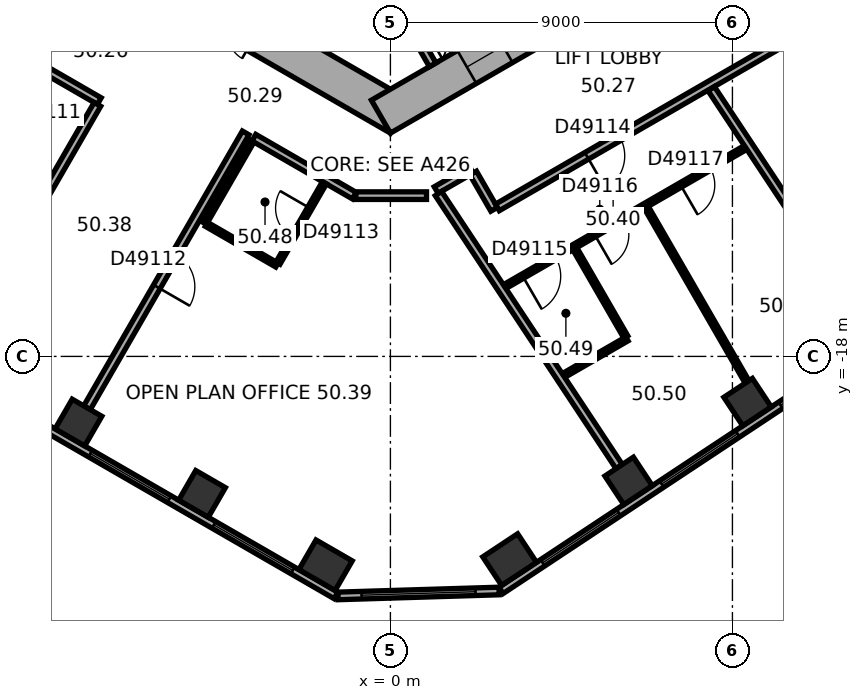
"""IFC4 building model, lengths in metres.
Left out: names, types, materials, properties, quantities, classifications, styles, units other than length and angle.
Written with IfcOpenShell. Run it as: python <this file> out.ifc"""

import sys

from ifc_helpers import new_model, si_unit, direction, frame, frame_2d, origin, origin_2d, place, context, subcontext, project, spatial, rectangle, extrude, element, fill, save


model = new_model("IFC4")
c1 = context("Model", 3, precision=1e-05, world=origin(), true_north=direction((0.0, 1.0)))
c2 = subcontext(c1, "Body", "Model", "MODEL_VIEW")
j1 = project(units=[si_unit("LENGTHUNIT", "METRE"), si_unit("PLANEANGLEUNIT", "RADIAN")], contexts=[c1])
p1 = place(None, origin())
s1 = spatial("IfcSite", under=j1, at=p1, CompositionType="ELEMENT")
p2 = place(p1, origin())
s2 = spatial("IfcBuilding", under=s1, at=p2, CompositionType="ELEMENT")
p3 = place(p2, frame((0.0, 0.0, 202.1)))
s3 = spatial("IfcBuildingStorey", under=s2, at=p3, CompositionType="ELEMENT", Elevation=202.1)
for number, where, z_axis, x_axis in (
    (1, (-8.208, -19.74, 0.0), (0.0, 0.0, 1.0), (0.866, -0.5, 0.0)),
    (2, (-4.958, -21.617, 0.0), (0.0, 0.0, 1.0), (0.866, -0.5, 0.0)),
):
    element("IfcColumn", number, at=place(p3, frame(where, z_axis=z_axis, x_axis=x_axis)), inside=s3, PredefinedType="COLUMN", context=c2, shape_type="SweptSolid", body=[
        extrude(rectangle(XDim=0.9, YDim=0.9, at=origin_2d()), origin(), (0.0, 0.0, 1.0), 3.7),
    ])
for number, where, z_axis, x_axis in (
    (3, (-1.706, -23.494, 0.0), (0.0, 0.0, 1.0), (0.866, -0.5, 0.0)),
    (4, (3.137, -23.346, 0.0), (0.0, 0.0, 1.0), (0.834, 0.552, 0.0)),
):
    element("IfcColumn", number, at=place(p3, frame(where, z_axis=z_axis, x_axis=x_axis)), inside=s3, PredefinedType="COLUMN", context=c2, shape_type="SweptSolid", body=[
        extrude(rectangle(XDim=1.1, YDim=0.9, at=origin_2d()), origin(), (0.0, 0.0, 1.0), 3.7),
    ])
for number, where, z_axis, x_axis in (
    (5, (6.268, -21.274, 0.0), (0.0, 0.0, 1.0), (0.834, 0.552, 0.0)),
    (6, (9.398, -19.202, 0.0), (0.0, 0.0, 1.0), (0.834, 0.552, 0.0)),
):
    element("IfcColumn", number, at=place(p3, frame(where, z_axis=z_axis, x_axis=x_axis)), inside=s3, PredefinedType="COLUMN", context=c2, shape_type="SweptSolid", body=[
        extrude(rectangle(XDim=0.9, YDim=0.9, at=origin_2d()), origin(), (0.0, 0.0, 1.0), 3.7),
    ])
p4 = place(p3, frame((-10.25, -5.629, 0.0), z_axis=(0.0, 0.0, 1.0), x_axis=(0.866022616891, -0.50000482701, 0.0)))
e7 = element("IfcWall", 7, at=p4, inside=s3, PredefinedType="SHEAR", context=c2, shape_type="SweptSolid", body=[
    extrude(rectangle(XDim=12.125, YDim=1.0, at=frame_2d((6.062, 0.0))), origin(), (0.0, 0.0, 1.0), 3.7),
])
p5 = place(p4, frame((6.262, 0.0, 0.0)))
e8 = element("IfcOpeningElement", 8, at=p5, cuts=e7, PredefinedType="OPENING", context=c2, shape_type="SweptSolid", body=[
    extrude(rectangle(XDim=1.5, YDim=2.1, at=frame_2d((0.75, 1.05))), frame((0.0, 0.51, 0.0), z_axis=(0.0, -1.0, 0.0), x_axis=(1.0, 0.0, 0.0)), (0.0, 0.0, 1.0), 1.02),
])
p6 = place(p4, frame((1.712, 0.0, 0.0)))
e9 = element("IfcOpeningElement", 9, at=p6, cuts=e7, PredefinedType="OPENING", context=c2, shape_type="SweptSolid", body=[
    extrude(rectangle(XDim=1.1, YDim=2.1, at=frame_2d((0.55, 1.05))), frame((0.0, 0.51, 0.0), z_axis=(0.0, -1.0, 0.0), x_axis=(1.0, 0.0, 0.0)), (0.0, 0.0, 1.0), 1.02),
])
p7 = place(p4, frame((4.312, 0.0, 0.0)))
e10 = element("IfcOpeningElement", 10, at=p7, cuts=e7, PredefinedType="OPENING", context=c2, shape_type="SweptSolid", body=[
    extrude(rectangle(XDim=1.1, YDim=2.1, at=frame_2d((0.55, 1.05))), frame((0.0, 0.51, 0.0), z_axis=(0.0, -1.0, 0.0), x_axis=(1.0, 0.0, 0.0)), (0.0, 0.0, 1.0), 1.02),
])
p8 = place(p3, frame((-0.25, -11.691, 0.0), z_axis=(0.0, 0.0, 1.0), x_axis=(0.866022616891, 0.50000482701, 0.0)))
e11 = element("IfcWall", 11, at=p8, inside=s3, PredefinedType="SHEAR", context=c2, shape_type="SweptSolid", body=[
    extrude(rectangle(XDim=12.125, YDim=1.0, at=frame_2d((6.062, 0.0))), origin(), (0.0, 0.0, 1.0), 3.7),
])
p9 = place(p8, frame((2.612, 0.0, 0.0)))
e12 = element("IfcOpeningElement", 12, at=p9, cuts=e11, PredefinedType="OPENING", context=c2, shape_type="SweptSolid", body=[
    extrude(rectangle(XDim=1.1, YDim=2.1, at=frame_2d((0.55, 1.05))), frame((0.0, 0.51, 0.0), z_axis=(0.0, -1.0, 0.0), x_axis=(1.0, 0.0, 0.0)), (0.0, 0.0, 1.0), 1.02),
])
p10 = place(p8, frame((5.212, 0.0, 0.0)))
e13 = element("IfcOpeningElement", 13, at=p10, cuts=e11, PredefinedType="OPENING", context=c2, shape_type="SweptSolid", body=[
    extrude(rectangle(XDim=1.1, YDim=2.1, at=frame_2d((0.55, 1.05))), frame((0.0, 0.51, 0.0), z_axis=(0.0, -1.0, 0.0), x_axis=(1.0, 0.0, 0.0)), (0.0, 0.0, 1.0), 1.02),
])
p11 = place(p8, frame((7.812, 0.0, 0.0)))
e14 = element("IfcOpeningElement", 14, at=p11, cuts=e11, PredefinedType="OPENING", context=c2, shape_type="SweptSolid", body=[
    extrude(rectangle(XDim=1.1, YDim=2.1, at=frame_2d((0.55, 1.05))), frame((0.0, 0.51, 0.0), z_axis=(0.0, -1.0, 0.0), x_axis=(1.0, 0.0, 0.0)), (0.0, 0.0, 1.0), 1.02),
])
p12 = place(p3, frame((-18.789, -14.267, 0.0), z_axis=(0.0, 0.0, 1.0), x_axis=(0.866023315909, -0.500003616288, 0.0)))
e15 = element("IfcWall", 15, at=p12, inside=s3, PredefinedType="STANDARD", context=c2, shape_type="SweptSolid", body=[
    extrude(rectangle(XDim=20.044, YDim=0.2, at=frame_2d((10.022, 0.0))), origin(), (0.0, 0.0, 1.0), 3.7),
])
p13 = place(p12, frame((1.314, 0.0, 0.9)))
e16 = element("IfcOpeningElement", 16, at=p13, cuts=e15, PredefinedType="OPENING", context=c2, shape_type="SweptSolid", body=[
    extrude(rectangle(XDim=2.4, YDim=2.0, at=frame_2d((1.2, 1.0))), frame((0.0, 0.11, 0.0), z_axis=(0.0, -1.0, 0.0), x_axis=(1.0, 0.0, 0.0)), (0.0, 0.0, 1.0), 0.22),
])
p14 = place(p12, frame((5.069, 0.0, 0.9)))
e17 = element("IfcOpeningElement", 17, at=p14, cuts=e15, PredefinedType="OPENING", context=c2, shape_type="SweptSolid", body=[
    extrude(rectangle(XDim=2.4, YDim=2.0, at=frame_2d((1.2, 1.0))), frame((0.0, 0.11, 0.0), z_axis=(0.0, -1.0, 0.0), x_axis=(1.0, 0.0, 0.0)), (0.0, 0.0, 1.0), 0.22),
])
p15 = place(p12, frame((8.823, 0.0, 0.9)))
e18 = element("IfcOpeningElement", 18, at=p15, cuts=e15, PredefinedType="OPENING", context=c2, shape_type="SweptSolid", body=[
    extrude(rectangle(XDim=2.4, YDim=2.0, at=frame_2d((1.2, 1.0))), frame((0.0, 0.11, 0.0), z_axis=(0.0, -1.0, 0.0), x_axis=(1.0, 0.0, 0.0)), (0.0, 0.0, 1.0), 0.22),
])
p16 = place(p12, frame((12.577, 0.0, 0.9)))
e19 = element("IfcOpeningElement", 19, at=p16, cuts=e15, PredefinedType="OPENING", context=c2, shape_type="SweptSolid", body=[
    extrude(rectangle(XDim=2.4, YDim=2.0, at=frame_2d((1.2, 1.0))), frame((0.0, 0.11, 0.0), z_axis=(0.0, -1.0, 0.0), x_axis=(1.0, 0.0, 0.0)), (0.0, 0.0, 1.0), 0.22),
])
p17 = place(p12, frame((16.331, 0.0, 0.9)))
e20 = element("IfcOpeningElement", 20, at=p17, cuts=e15, PredefinedType="OPENING", context=c2, shape_type="SweptSolid", body=[
    extrude(rectangle(XDim=2.4, YDim=2.0, at=frame_2d((1.2, 1.0))), frame((0.0, 0.11, 0.0), z_axis=(0.0, -1.0, 0.0), x_axis=(1.0, 0.0, 0.0)), (0.0, 0.0, 1.0), 0.22),
])
p18 = place(p3, frame((-1.378, -24.302, 0.0), z_axis=(0.0, 0.0, 1.0), x_axis=(0.999533857267, 0.030529791629, 0.0)))
e21 = element("IfcWall", 21, at=p18, inside=s3, PredefinedType="STANDARD", context=c2, shape_type="SweptSolid", body=[
    extrude(rectangle(XDim=4.238, YDim=0.2, at=frame_2d((2.119, 0.0))), origin(), (0.0, 0.0, 1.0), 3.7),
])
p19 = place(p18, frame((0.619, 0.0, 0.9)))
e22 = element("IfcOpeningElement", 22, at=p19, cuts=e21, PredefinedType="OPENING", context=c2, shape_type="SweptSolid", body=[
    extrude(rectangle(XDim=3.0, YDim=2.0, at=frame_2d((1.5, 1.0))), frame((0.0, 0.11, 0.0), z_axis=(0.0, -1.0, 0.0), x_axis=(1.0, 0.0, 0.0)), (0.0, 0.0, 1.0), 0.22),
])
p20 = place(p3, frame((2.911, -24.156, 0.0), z_axis=(0.0, 0.0, 1.0), x_axis=(0.833882163564, 0.551942512668, 0.0)))
e23 = element("IfcWall", 23, at=p20, inside=s3, PredefinedType="STANDARD", context=c2, shape_type="SweptSolid", body=[
    extrude(rectangle(XDim=20.044, YDim=0.2, at=frame_2d((10.022, 0.0))), origin(), (0.0, 0.0, 1.0), 3.7),
])
p21 = place(p20, frame((1.313, 0.0, 0.9)))
e24 = element("IfcOpeningElement", 24, at=p21, cuts=e23, PredefinedType="OPENING", context=c2, shape_type="SweptSolid", body=[
    extrude(rectangle(XDim=2.4, YDim=2.0, at=frame_2d((1.2, 1.0))), frame((0.0, 0.11, 0.0), z_axis=(0.0, -1.0, 0.0), x_axis=(1.0, 0.0, 0.0)), (0.0, 0.0, 1.0), 0.22),
])
p22 = place(p20, frame((5.067, 0.0, 0.9)))
e25 = element("IfcOpeningElement", 25, at=p22, cuts=e23, PredefinedType="OPENING", context=c2, shape_type="SweptSolid", body=[
    extrude(rectangle(XDim=2.4, YDim=2.0, at=frame_2d((1.2, 1.0))), frame((0.0, 0.11, 0.0), z_axis=(0.0, -1.0, 0.0), x_axis=(1.0, 0.0, 0.0)), (0.0, 0.0, 1.0), 0.22),
])
p23 = place(p20, frame((8.821, 0.0, 0.9)))
e26 = element("IfcOpeningElement", 26, at=p23, cuts=e23, PredefinedType="OPENING", context=c2, shape_type="SweptSolid", body=[
    extrude(rectangle(XDim=2.4, YDim=2.0, at=frame_2d((1.2, 1.0))), frame((0.0, 0.11, 0.0), z_axis=(0.0, -1.0, 0.0), x_axis=(1.0, 0.0, 0.0)), (0.0, 0.0, 1.0), 0.22),
])
p24 = place(p20, frame((12.575, 0.0, 0.9)))
e27 = element("IfcOpeningElement", 27, at=p24, cuts=e23, PredefinedType="OPENING", context=c2, shape_type="SweptSolid", body=[
    extrude(rectangle(XDim=2.4, YDim=2.0, at=frame_2d((1.2, 1.0))), frame((0.0, 0.11, 0.0), z_axis=(0.0, -1.0, 0.0), x_axis=(1.0, 0.0, 0.0)), (0.0, 0.0, 1.0), 0.22),
])
p25 = place(p20, frame((16.329, 0.0, 0.9)))
e28 = element("IfcOpeningElement", 28, at=p25, cuts=e23, PredefinedType="OPENING", context=c2, shape_type="SweptSolid", body=[
    extrude(rectangle(XDim=2.4, YDim=2.0, at=frame_2d((1.2, 1.0))), frame((0.0, 0.11, 0.0), z_axis=(0.0, -1.0, 0.0), x_axis=(1.0, 0.0, 0.0)), (0.0, 0.0, 1.0), 0.22),
])
p26 = place(p3, frame((0.013, -8.422, 0.0), z_axis=(0.0, 0.0, 1.0), x_axis=(0.500077893725, -0.86598042715, 0.0)))
e29 = element("IfcWall", 29, at=p26, inside=s3, PredefinedType="PARTITIONING", context=c2, shape_type="SweptSolid", body=[
    extrude(rectangle(XDim=2.2, YDim=0.2, at=frame_2d((1.1, 0.0))), origin(), (0.0, 0.0, 1.0), 3.35),
])
p27 = place(p3, frame((-11.435, -9.103, 0.0), z_axis=(0.0, 0.0, 1.0), x_axis=(0.866007399799, -0.500031182522, 0.0)))
e30 = element("IfcWall", 30, at=p27, inside=s3, PredefinedType="PARTITIONING", context=c2, shape_type="SweptSolid", body=[
    extrude(rectangle(XDim=4.358, YDim=0.2, at=frame_2d((2.179, 0.0))), origin(), (0.0, 0.0, 1.0), 3.35),
])
p28 = place(p3, frame((-11.235, -17.474, 0.0), z_axis=(0.0, 0.0, 1.0), x_axis=(0.500009260695, 0.866020057054, 0.0)))
e31 = element("IfcWall", 31, at=p28, inside=s3, PredefinedType="PARTITIONING", context=c2, shape_type="SweptSolid", body=[
    extrude(rectangle(XDim=7.049, YDim=0.2, at=frame_2d((3.524, 0.0))), origin(), (0.0, 0.0, 1.0), 2.55),
])
p29 = place(p28, frame((3.024, 0.0, 0.0)))
e32 = element("IfcOpeningElement", 32, at=p29, cuts=e31, PredefinedType="OPENING", context=c2, shape_type="SweptSolid", body=[
    extrude(rectangle(XDim=1.0, YDim=2.1, at=frame_2d((0.5, 1.05))), frame((0.0, 0.11, 0.0), z_axis=(0.0, -1.0, 0.0), x_axis=(1.0, 0.0, 0.0)), (0.0, 0.0, 1.0), 0.22),
])
p30 = place(p3, frame((-7.984, -19.351, 0.0), z_axis=(0.0, 0.0, 1.0), x_axis=(0.500010139422, 0.866019549707, 0.0)))
e33 = element("IfcWall", 33, at=p30, inside=s3, PredefinedType="PARTITIONING", context=c2, shape_type="SweptSolid", body=[
    extrude(rectangle(XDim=8.35, YDim=0.2, at=frame_2d((4.175, 0.0))), origin(), (0.0, 0.0, 1.0), 3.35),
])
p31 = place(p30, frame((3.675, 0.0, 0.0)))
e34 = element("IfcOpeningElement", 34, at=p31, cuts=e33, PredefinedType="OPENING", context=c2, shape_type="SweptSolid", body=[
    extrude(rectangle(XDim=1.0, YDim=2.1, at=frame_2d((0.5, 1.05))), frame((0.0, 0.11, 0.0), z_axis=(0.0, -1.0, 0.0), x_axis=(1.0, 0.0, 0.0)), (0.0, 0.0, 1.0), 0.22),
])
p32 = place(p3, frame((-4.892, -14.496, 0.0), z_axis=(0.0, 0.0, 1.0), x_axis=(0.500004234368, 0.866022959057, 0.0)))
e35 = element("IfcWall", 35, at=p32, inside=s3, PredefinedType="PARTITIONING", context=c2, shape_type="SweptSolid", body=[
    extrude(rectangle(XDim=2.5, YDim=0.12, at=frame_2d((1.25, 0.0))), origin(), (0.0, 0.0, 1.0), 3.35),
])
p33 = place(p3, frame((-3.592, -12.244, 0.0), z_axis=(0.0, 0.0, 1.0), x_axis=(0.866028335764, -0.499994921628, 0.0)))
e36 = element("IfcWall", 36, at=p33, inside=s3, PredefinedType="PARTITIONING", context=c2, shape_type="SweptSolid", body=[
    extrude(rectangle(XDim=3.051, YDim=0.2, at=frame_2d((1.525, 0.0))), origin(), (0.0, 0.0, 1.0), 3.35),
])
p34 = place(p3, frame((-2.987, -15.596, 0.0), z_axis=(0.0, 0.0, 1.0), x_axis=(-0.86600889856, 0.500028586798, 0.0)))
e37 = element("IfcWall", 37, at=p34, inside=s3, PredefinedType="PARTITIONING", context=c2, shape_type="SweptSolid", body=[
    extrude(rectangle(XDim=2.14, YDim=0.12, at=frame_2d((1.07, 0.0))), origin(), (0.0, 0.0, 1.0), 3.35),
])
p35 = place(p3, frame((-1.737, -13.431, 0.0), z_axis=(0.0, 0.0, 1.0), x_axis=(-0.499959183527, -0.866048967903, 0.0)))
e38 = element("IfcWall", 38, at=p35, inside=s3, PredefinedType="PARTITIONING", context=c2, shape_type="SweptSolid", body=[
    extrude(rectangle(XDim=2.44, YDim=0.12, at=frame_2d((1.22, 0.0))), origin(), (0.0, 0.0, 1.0), 3.35),
])
p36 = place(p35, frame((0.77, 0.0, 0.0)))
e39 = element("IfcOpeningElement", 39, at=p36, cuts=e38, PredefinedType="OPENING", context=c2, shape_type="SweptSolid", body=[
    extrude(rectangle(XDim=0.9, YDim=2.1, at=frame_2d((0.45, 1.05))), frame((0.0, 0.07, 0.0), z_axis=(0.0, -1.0, 0.0), x_axis=(1.0, 0.0, 0.0)), (0.0, 0.0, 1.0), 0.14),
])
p37 = place(p3, frame((-0.91, -13.77, 0.0), z_axis=(0.0, 0.0, 1.0), x_axis=(1.0, 0.0, 0.0)))
e40 = element("IfcWall", 40, at=p37, inside=s3, PredefinedType="PARTITIONING", context=c2, shape_type="SweptSolid", body=[
    extrude(rectangle(XDim=1.86, YDim=0.2, at=frame_2d((0.93, 0.0))), origin(), (0.0, 0.0, 1.0), 3.35),
])
p38 = place(p3, frame((1.204, -13.623, 0.0), z_axis=(0.0, 0.0, 1.0), x_axis=(0.866040989419, 0.499973003918, 0.0)))
e41 = element("IfcWall", 41, at=p38, inside=s3, PredefinedType="PARTITIONING", context=c2, shape_type="SweptSolid", body=[
    extrude(rectangle(XDim=1.068, YDim=0.2, at=frame_2d((0.534, 0.0))), origin(), (0.0, 0.0, 1.0), 3.35),
])
p39 = place(p3, frame((2.179, -13.176, 0.0), z_axis=(0.0, 0.0, 1.0), x_axis=(0.499978356969, -0.866037899034, 0.0)))
e42 = element("IfcWall", 42, at=p39, inside=s3, PredefinedType="PARTITIONING", context=c2, shape_type="SweptSolid", body=[
    extrude(rectangle(XDim=1.101, YDim=0.2, at=frame_2d((0.551, 0.0))), origin(), (0.0, 0.0, 1.0), 3.35),
])
p40 = place(p3, frame((2.816, -14.079, 0.0), z_axis=(0.0, 0.0, 1.0), x_axis=(0.866021128829, 0.500007404367, 0.0)))
e43 = element("IfcWall", 43, at=p40, inside=s3, PredefinedType="PARTITIONING", context=c2, shape_type="SweptSolid", body=[
    extrude(rectangle(XDim=8.702, YDim=0.2, at=frame_2d((4.351, 0.0))), origin(), (0.0, 0.0, 1.0), 3.35),
])
p41 = place(p40, frame((2.714, 0.0, 0.0)))
e44 = element("IfcOpeningElement", 44, at=p41, cuts=e43, PredefinedType="OPENING", context=c2, shape_type="SweptSolid", body=[
    extrude(rectangle(XDim=1.0, YDim=2.1, at=frame_2d((0.5, 1.05))), frame((0.0, 0.11, 0.0), z_axis=(0.0, -1.0, 0.0), x_axis=(1.0, 0.0, 0.0)), (0.0, 0.0, 1.0), 0.22),
])
p42 = place(p3, frame((3.005, -16.164, 0.0), z_axis=(0.0, 0.0, 1.0), x_axis=(0.866018452427, 0.500012039911, 0.0)))
e45 = element("IfcWall", 45, at=p42, inside=s3, PredefinedType="PARTITIONING", context=c2, shape_type="SweptSolid", body=[
    extrude(rectangle(XDim=7.322, YDim=0.12, at=frame_2d((3.661, 0.0))), origin(), (0.0, 0.0, 1.0), 3.35),
])
p43 = place(p42, frame((0.55, 0.0, 0.0)))
e46 = element("IfcOpeningElement", 46, at=p43, cuts=e45, PredefinedType="OPENING", context=c2, shape_type="SweptSolid", body=[
    extrude(rectangle(XDim=1.0, YDim=2.1, at=frame_2d((0.5, 1.05))), frame((0.0, 0.07, 0.0), z_axis=(0.0, -1.0, 0.0), x_axis=(1.0, 0.0, 0.0)), (0.0, 0.0, 1.0), 0.14),
])
p44 = place(p42, frame((2.736, 0.0, 0.0)))
e47 = element("IfcOpeningElement", 47, at=p44, cuts=e45, PredefinedType="OPENING", context=c2, shape_type="SweptSolid", body=[
    extrude(rectangle(XDim=0.9, YDim=2.1, at=frame_2d((0.45, 1.05))), frame((0.0, 0.07, 0.0), z_axis=(0.0, -1.0, 0.0), x_axis=(1.0, 0.0, 0.0)), (0.0, 0.0, 1.0), 0.14),
])
p45 = place(p42, frame((5.347, 0.0, 0.0)))
e48 = element("IfcOpeningElement", 48, at=p45, cuts=e45, PredefinedType="OPENING", context=c2, shape_type="SweptSolid", body=[
    extrude(rectangle(XDim=0.9, YDim=2.1, at=frame_2d((0.45, 1.05))), frame((0.0, 0.07, 0.0), z_axis=(0.0, -1.0, 0.0), x_axis=(1.0, 0.0, 0.0)), (0.0, 0.0, 1.0), 0.14),
])
p46 = place(p3, frame((4.553, -18.503, 0.0), z_axis=(0.0, 0.0, 1.0), x_axis=(0.865951573249, 0.50012785644, 0.0)))
e49 = element("IfcWall", 49, at=p46, inside=s3, PredefinedType="PARTITIONING", context=c2, shape_type="SweptSolid", body=[
    extrude(rectangle(XDim=1.929, YDim=0.12, at=frame_2d((0.964, 0.0))), origin(), (0.0, 0.0, 1.0), 3.35),
])
p47 = place(p3, frame((6.02, -20.899, 0.0), z_axis=(0.0, 0.0, 1.0), x_axis=(-0.551943990108, 0.833881185651, 0.0)))
e50 = element("IfcWall", 50, at=p47, inside=s3, PredefinedType="PARTITIONING", context=c2, shape_type="SweptSolid", body=[
    extrude(rectangle(XDim=8.615, YDim=0.2, at=frame_2d((4.308, 0.0))), origin(), (0.0, 0.0, 1.0), 3.35),
])
p48 = place(p3, frame((6.194, -17.487, 0.0), z_axis=(0.0, 0.0, 1.0), x_axis=(-0.499980071345, 0.866036909293, 0.0)))
e51 = element("IfcWall", 51, at=p48, inside=s3, PredefinedType="PARTITIONING", context=c2, shape_type="SweptSolid", body=[
    extrude(rectangle(XDim=2.68, YDim=0.12, at=frame_2d((1.34, 0.0))), origin(), (0.0, 0.0, 1.0), 3.35),
])
p49 = place(p3, frame((9.385, -18.672, 0.0), z_axis=(0.0, 0.0, 1.0), x_axis=(-0.500012117035, 0.866018407898, 0.0)))
e52 = element("IfcWall", 52, at=p49, inside=s3, PredefinedType="PARTITIONING", context=c2, shape_type="SweptSolid", body=[
    extrude(rectangle(XDim=5.302, YDim=0.12, at=frame_2d((2.651, 0.0))), origin(), (0.0, 0.0, 1.0), 2.55),
])
p50 = place(p3, frame((12.281, -16.755, 0.0), z_axis=(0.0, 0.0, 1.0), x_axis=(-0.551925794663, 0.833893228888, 0.0)))
e53 = element("IfcWall", 53, at=p50, inside=s3, PredefinedType="PARTITIONING", context=c2, shape_type="SweptSolid", body=[
    extrude(rectangle(XDim=6.953, YDim=0.2, at=frame_2d((3.476, 0.0))), origin(), (0.0, 0.0, 1.0), 3.35),
])
p51 = place(p16, origin())
e54 = element("IfcWindow", 54, at=p51, inside=s3, PartitioningType="SINGLE_PANEL", PredefinedType="WINDOW", context=c2, shape_type="SweptSolid", body=[
    extrude(rectangle(XDim=2.4, YDim=2.0, at=frame_2d((1.2, 1.0))), frame((0.0, 0.03, 0.0), z_axis=(0.0, -1.0, 0.0), x_axis=(1.0, 0.0, 0.0)), (0.0, 0.0, 1.0), 0.06),
])
fill(e19, e54)
p52 = place(p17, origin())
e55 = element("IfcWindow", 55, at=p52, inside=s3, PartitioningType="SINGLE_PANEL", PredefinedType="WINDOW", context=c2, shape_type="SweptSolid", body=[
    extrude(rectangle(XDim=2.4, YDim=2.0, at=frame_2d((1.2, 1.0))), frame((0.0, 0.03, 0.0), z_axis=(0.0, -1.0, 0.0), x_axis=(1.0, 0.0, 0.0)), (0.0, 0.0, 1.0), 0.06),
])
fill(e20, e55)
p53 = place(p19, origin())
e56 = element("IfcWindow", 56, at=p53, inside=s3, PartitioningType="SINGLE_PANEL", PredefinedType="WINDOW", context=c2, shape_type="SweptSolid", body=[
    extrude(rectangle(XDim=3.0, YDim=2.0, at=frame_2d((1.5, 1.0))), frame((0.0, 0.03, 0.0), z_axis=(0.0, -1.0, 0.0), x_axis=(1.0, 0.0, 0.0)), (0.0, 0.0, 1.0), 0.06),
])
fill(e22, e56)
p54 = place(p21, origin())
e57 = element("IfcWindow", 57, at=p54, inside=s3, PartitioningType="SINGLE_PANEL", PredefinedType="WINDOW", context=c2, shape_type="SweptSolid", body=[
    extrude(rectangle(XDim=2.4, YDim=2.0, at=frame_2d((1.2, 1.0))), frame((0.0, 0.03, 0.0), z_axis=(0.0, -1.0, 0.0), x_axis=(1.0, 0.0, 0.0)), (0.0, 0.0, 1.0), 0.06),
])
fill(e24, e57)
p55 = place(p22, origin())
e58 = element("IfcWindow", 58, at=p55, inside=s3, PartitioningType="SINGLE_PANEL", PredefinedType="WINDOW", context=c2, shape_type="SweptSolid", body=[
    extrude(rectangle(XDim=2.4, YDim=2.0, at=frame_2d((1.2, 1.0))), frame((0.0, 0.03, 0.0), z_axis=(0.0, -1.0, 0.0), x_axis=(1.0, 0.0, 0.0)), (0.0, 0.0, 1.0), 0.06),
])
fill(e25, e58)
p56 = place(p23, origin())
e59 = element("IfcWindow", 59, at=p56, inside=s3, PartitioningType="SINGLE_PANEL", PredefinedType="WINDOW", context=c2, shape_type="SweptSolid", body=[
    extrude(rectangle(XDim=2.4, YDim=2.0, at=frame_2d((1.2, 1.0))), frame((0.0, 0.03, 0.0), z_axis=(0.0, -1.0, 0.0), x_axis=(1.0, 0.0, 0.0)), (0.0, 0.0, 1.0), 0.06),
])
fill(e26, e59)
p57 = place(p9, origin())
e60 = element("IfcDoor", 60, at=p57, inside=s3, OperationType="DOUBLE_DOOR_SLIDING", PredefinedType="DOOR", context=c2, shape_type="SweptSolid", body=[
    extrude(rectangle(XDim=1.1, YDim=2.1, at=frame_2d((0.55, 1.05))), frame((0.0, 0.025, 0.0), z_axis=(0.0, -1.0, 0.0), x_axis=(1.0, 0.0, 0.0)), (0.0, 0.0, 1.0), 0.05),
])
fill(e12, e60)
p58 = place(p31, origin())
e61 = element("IfcDoor", 61, at=p58, inside=s3, OperationType="SINGLE_SWING_LEFT", PredefinedType="DOOR", context=c2, shape_type="SweptSolid", body=[
    extrude(rectangle(XDim=1.0, YDim=2.1, at=frame_2d((0.5, 1.05))), frame((0.0, 0.025, 0.0), z_axis=(0.0, -1.0, 0.0), x_axis=(1.0, 0.0, 0.0)), (0.0, 0.0, 1.0), 0.05),
])
fill(e34, e61)
p59 = place(p36, origin())
e62 = element("IfcDoor", 62, at=p59, inside=s3, OperationType="SINGLE_SWING_LEFT", PredefinedType="DOOR", context=c2, shape_type="SweptSolid", body=[
    extrude(rectangle(XDim=0.9, YDim=2.1, at=frame_2d((0.45, 1.05))), frame((0.0, 0.025, 0.0), z_axis=(0.0, -1.0, 0.0), x_axis=(1.0, 0.0, 0.0)), (0.0, 0.0, 1.0), 0.05),
])
fill(e39, e62)
p60 = place(p41, origin())
e63 = element("IfcDoor", 63, at=p60, inside=s3, OperationType="SINGLE_SWING_LEFT", PredefinedType="DOOR", context=c2, shape_type="SweptSolid", body=[
    extrude(rectangle(XDim=1.0, YDim=2.1, at=frame_2d((0.5, 1.05))), frame((0.0, 0.025, 0.0), z_axis=(0.0, -1.0, 0.0), x_axis=(1.0, 0.0, 0.0)), (0.0, 0.0, 1.0), 0.05),
])
fill(e44, e63)
p61 = place(p43, origin())
e64 = element("IfcDoor", 64, at=p61, inside=s3, OperationType="SINGLE_SWING_LEFT", PredefinedType="DOOR", context=c2, shape_type="SweptSolid", body=[
    extrude(rectangle(XDim=1.0, YDim=2.1, at=frame_2d((0.5, 1.05))), frame((0.0, 0.025, 0.0), z_axis=(0.0, -1.0, 0.0), x_axis=(1.0, 0.0, 0.0)), (0.0, 0.0, 1.0), 0.05),
])
fill(e46, e64)
p62 = place(p44, origin())
e65 = element("IfcDoor", 65, at=p62, inside=s3, OperationType="SINGLE_SWING_LEFT", PredefinedType="DOOR", context=c2, shape_type="SweptSolid", body=[
    extrude(rectangle(XDim=0.9, YDim=2.1, at=frame_2d((0.45, 1.05))), frame((0.0, 0.025, 0.0), z_axis=(0.0, -1.0, 0.0), x_axis=(1.0, 0.0, 0.0)), (0.0, 0.0, 1.0), 0.05),
])
fill(e47, e65)
p63 = place(p45, origin())
e66 = element("IfcDoor", 66, at=p63, inside=s3, OperationType="SINGLE_SWING_LEFT", PredefinedType="DOOR", context=c2, shape_type="SweptSolid", body=[
    extrude(rectangle(XDim=0.9, YDim=2.1, at=frame_2d((0.45, 1.05))), frame((0.0, 0.025, 0.0), z_axis=(0.0, -1.0, 0.0), x_axis=(1.0, 0.0, 0.0)), (0.0, 0.0, 1.0), 0.05),
])
fill(e48, e66)
save(model, sys.argv[1])
